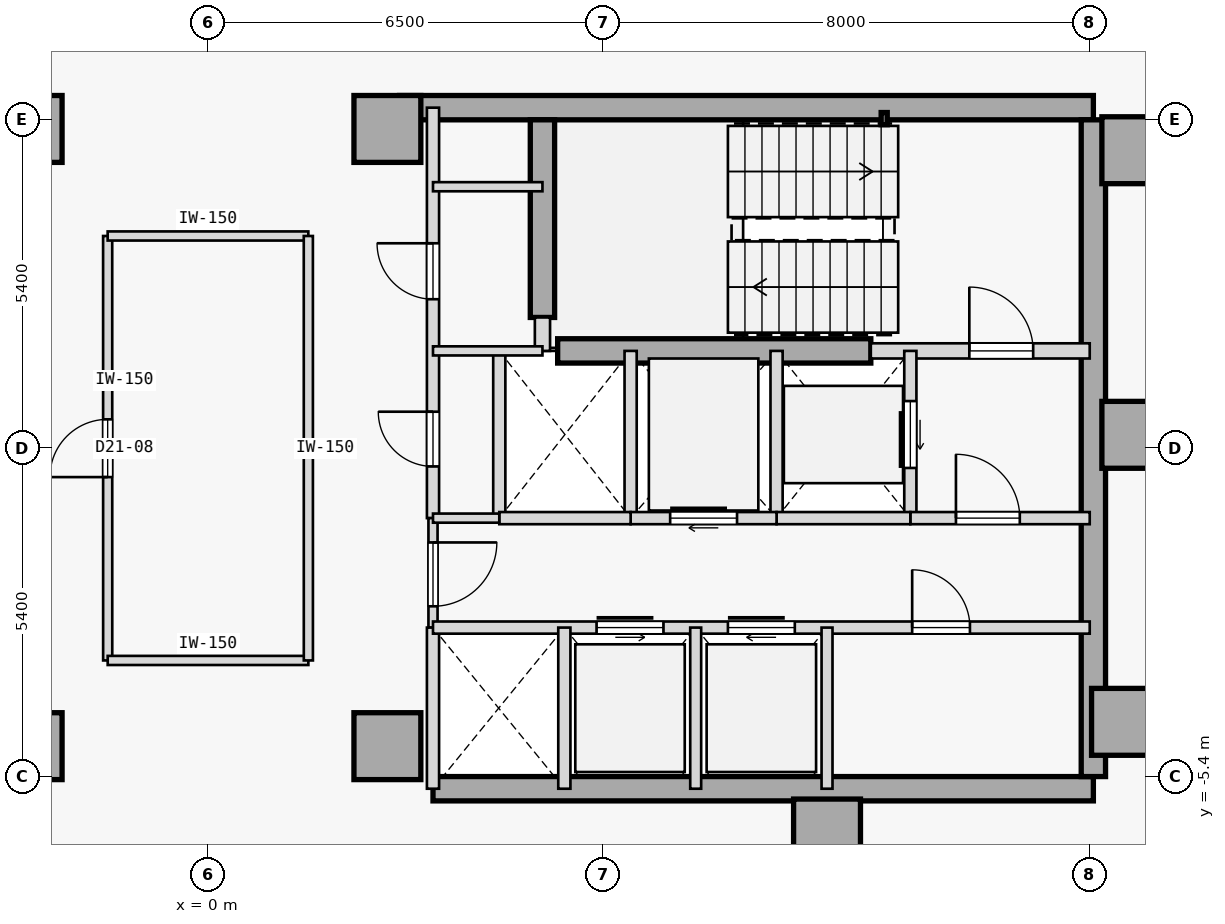
"""IFC4 building model, lengths in metres.
Left out: names, types, materials, properties, quantities, classifications, styles, units other than length and angle.
Written with IfcOpenShell. Run it as: python <this file> out.ifc"""

import sys

from ifc_helpers import new_model, si_unit, direction, frame, frame_2d, origin, origin_2d, place, context, subcontext, project, spatial, rectangle, hollow_rectangle, extrude, element, fill, save


model = new_model("IFC4")
c1 = context("Model", 3, precision=1e-05, world=origin(), true_north=direction((0.0, 1.0)))
c2 = subcontext(c1, "Body", "Model", "MODEL_VIEW")
j1 = project(units=[si_unit("LENGTHUNIT", "METRE"), si_unit("PLANEANGLEUNIT", "RADIAN")], contexts=[c1])
p1 = place(None, origin())
s1 = spatial("IfcSite", under=j1, at=p1, CompositionType="ELEMENT")
p2 = place(p1, origin())
s2 = spatial("IfcBuilding", under=s1, at=p2, CompositionType="ELEMENT")
p3 = place(p2, frame((0.0, 0.0, 87.4)))
s3 = spatial("IfcBuildingStorey", under=s2, at=p3, CompositionType="ELEMENT", Elevation=87.4)
for number, where, z_axis, x_axis in (
    (1, (-2.95, -4.9, 0.0), (0.0, 0.0, 1.0), (1.0, 0.0, 0.0)),
    (2, (-2.95, 5.25, 0.0), (0.0, 0.0, 1.0), (1.0, 0.0, 0.0)),
    (3, (15.25, 4.9, 0.0), (0.0, 0.0, 1.0), (1.0, 0.0, 0.0)),
    (4, (15.25, 0.22, 0.0), (0.0, 0.0, 1.0), (1.0, 0.0, 0.0)),
    (5, (15.08, -4.5, 0.0), (0.0, 0.0, 1.0), (1.0, 0.0, 0.0)),
    (6, (10.18, -6.32, 0.0), (0.0, 0.0, 1.0), (1.0, 0.0, 0.0)),
    (7, (2.95, -4.9, 0.0), (0.0, 0.0, 1.0), (1.0, 0.0, 0.0)),
    (8, (2.95, 5.25, 0.0), (0.0, 0.0, 1.0), (1.0, 0.0, 0.0)),
):
    element("IfcColumn", number, at=place(p3, frame(where, z_axis=z_axis, x_axis=x_axis)), inside=s3, PredefinedType="COLUMN", context=c2, shape_type="SweptSolid", body=[
        extrude(rectangle(XDim=1.1, YDim=1.1, at=origin_2d()), origin(), (0.0, 0.0, 1.0), 3.7),
    ])
p4 = place(p3, frame((3.15, 5.6, 0.0), z_axis=(0.0, 0.0, 1.0), x_axis=(1.0, 0.0, 0.0)))
e9 = element("IfcWall", 9, at=p4, inside=s3, PredefinedType="SHEAR", context=c2, shape_type="SweptSolid", body=[
    extrude(rectangle(XDim=11.41, YDim=0.4, at=frame_2d((5.705, 0.0))), origin(), (0.0, 0.0, 1.0), 3.475),
])
p5 = place(p3, frame((3.7, -5.6, 0.0), z_axis=(0.0, 0.0, 1.0), x_axis=(1.0, 0.0, 0.0)))
e10 = element("IfcWall", 10, at=p5, inside=s3, PredefinedType="SHEAR", context=c2, shape_type="SweptSolid", body=[
    extrude(rectangle(XDim=10.86, YDim=0.4, at=frame_2d((5.43, 0.0))), origin(), (0.0, 0.0, 1.0), 3.475),
])
p6 = place(p3, frame((14.56, -5.4, 0.0), z_axis=(0.0, 0.0, 1.0), x_axis=(0.0, 1.0, 0.0)))
e11 = element("IfcWall", 11, at=p6, inside=s3, PredefinedType="SHEAR", context=c2, shape_type="SweptSolid", body=[
    extrude(rectangle(XDim=10.8, YDim=0.4, at=frame_2d((5.4, 0.0))), origin(), (0.0, 0.0, 1.0), 3.475),
])
p7 = place(p3, frame((5.5, 2.15, 0.0), z_axis=(0.0, 0.0, 1.0), x_axis=(0.0, 1.0, 0.0)))
e12 = element("IfcWall", 12, at=p7, inside=s3, PredefinedType="SHEAR", context=c2, shape_type="SweptSolid", body=[
    extrude(rectangle(XDim=3.25, YDim=0.4, at=frame_2d((1.625, 0.0))), origin(), (0.0, 0.0, 1.0), 3.475),
])
p8 = place(p3, frame((5.75, 1.6, 0.0), z_axis=(0.0, 0.0, 1.0), x_axis=(1.0, 0.0, 0.0)))
e13 = element("IfcWall", 13, at=p8, inside=s3, PredefinedType="SHEAR", context=c2, shape_type="SweptSolid", body=[
    extrude(rectangle(XDim=5.15, YDim=0.4, at=frame_2d((2.575, 0.0))), origin(), (0.0, 0.0, 1.0), 3.475),
])
p9 = place(p3, frame((11.12, 5.42, 0.0), z_axis=(0.0, 0.0, 1.0), x_axis=(1.0, 0.0, 0.0)))
e14 = element("IfcColumn", 14, at=p9, inside=s3, PredefinedType="COLUMN", context=c2, shape_type="SweptSolid", body=[
    extrude(hollow_rectangle(XDim=0.1, YDim=0.2, WallThickness=0.008, at=origin_2d()), origin(), (0.0, 0.0, 1.0), 3.7),
])
p10 = place(p3, frame((10.9, 1.6, 0.0), z_axis=(0.0, 0.0, 1.0), x_axis=(1.0, 0.0, 0.0)))
e15 = element("IfcWall", 15, at=p10, inside=s3, PredefinedType="STANDARD", context=c2, shape_type="SweptSolid", body=[
    extrude(rectangle(XDim=3.6, YDim=0.25, at=frame_2d((1.8, 0.0))), origin(), (0.0, 0.0, 1.0), 3.475),
])
p11 = place(p10, frame((1.62, 0.0, 0.0)))
e16 = element("IfcOpeningElement", 16, at=p11, cuts=e15, PredefinedType="OPENING", context=c2, shape_type="SweptSolid", body=[
    extrude(rectangle(XDim=1.05, YDim=2.15, at=frame_2d((0.525, 1.075))), frame((0.0, 0.135, 0.0), z_axis=(0.0, -1.0, 0.0), x_axis=(1.0, 0.0, 0.0)), (0.0, 0.0, 1.0), 0.27),
])
p12 = place(p3, frame((5.5, 1.6, 0.0), z_axis=(0.0, 0.0, 1.0), x_axis=(0.0, 1.0, 0.0)))
e17 = element("IfcWall", 17, at=p12, inside=s3, PredefinedType="STANDARD", context=c2, shape_type="SweptSolid", body=[
    extrude(rectangle(XDim=0.55, YDim=0.25, at=frame_2d((0.275, 0.0))), origin(), (0.0, 0.0, 1.0), 3.475),
])
p13 = place(p3, frame((3.7, -1.15, 0.0), z_axis=(0.0, 0.0, 1.0), x_axis=(0.0, 1.0, 0.0)))
e18 = element("IfcWall", 18, at=p13, inside=s3, PredefinedType="STANDARD", context=c2, shape_type="SweptSolid", body=[
    extrude(rectangle(XDim=6.75, YDim=0.2, at=frame_2d((3.375, 0.0))), origin(), (0.0, 0.0, 1.0), 3.475),
])
p14 = place(p13, frame((3.6, 0.0, 0.0)))
e19 = element("IfcOpeningElement", 19, at=p14, cuts=e18, PredefinedType="OPENING", context=c2, shape_type="SweptSolid", body=[
    extrude(rectangle(XDim=0.92, YDim=2.15, at=frame_2d((0.46, 1.075))), frame((0.0, 0.11, 0.0), z_axis=(0.0, -1.0, 0.0), x_axis=(1.0, 0.0, 0.0)), (0.0, 0.0, 1.0), 0.22),
])
p15 = place(p13, frame((0.85, 0.0, 0.0)))
e20 = element("IfcOpeningElement", 20, at=p15, cuts=e18, PredefinedType="OPENING", context=c2, shape_type="SweptSolid", body=[
    extrude(rectangle(XDim=0.9, YDim=2.15, at=frame_2d((0.45, 1.075))), frame((0.0, 0.11, 0.0), z_axis=(0.0, -1.0, 0.0), x_axis=(1.0, 0.0, 0.0)), (0.0, 0.0, 1.0), 0.22),
])
p16 = place(p3, frame((3.7, -2.95, 0.0), z_axis=(0.0, 0.0, 1.0), x_axis=(0.0, 1.0, 0.0)))
e21 = element("IfcWall", 21, at=p16, inside=s3, PredefinedType="PARTITIONING", context=c2, shape_type="SweptSolid", body=[
    extrude(rectangle(XDim=1.8, YDim=0.15, at=frame_2d((0.9, 0.0))), origin(), (0.0, 0.0, 1.0), 3.475),
])
p17 = place(p16, frame((0.35, 0.0, 0.0)))
e22 = element("IfcOpeningElement", 22, at=p17, cuts=e21, PredefinedType="OPENING", context=c2, shape_type="SweptSolid", body=[
    extrude(rectangle(XDim=1.05, YDim=2.18, at=frame_2d((0.525, 1.09))), frame((0.0, 0.085, 0.0), z_axis=(0.0, -1.0, 0.0), x_axis=(1.0, 0.0, 0.0)), (0.0, 0.0, 1.0), 0.17),
])
p18 = place(p3, frame((3.7, -5.6, 0.0), z_axis=(0.0, 0.0, 1.0), x_axis=(0.0, 1.0, 0.0)))
e23 = element("IfcWall", 23, at=p18, inside=s3, PredefinedType="STANDARD", context=c2, shape_type="SweptSolid", body=[
    extrude(rectangle(XDim=2.65, YDim=0.2, at=frame_2d((1.325, 0.0))), origin(), (0.0, 0.0, 1.0), 3.475),
])
p19 = place(p3, frame((11.55, -1.15, 0.0), z_axis=(0.0, 0.0, 1.0), x_axis=(0.0, 1.0, 0.0)))
e24 = element("IfcWall", 24, at=p19, inside=s3, PredefinedType="STANDARD", context=c2, shape_type="SweptSolid", body=[
    extrude(rectangle(XDim=2.75, YDim=0.2, at=frame_2d((1.375, 0.0))), origin(), (0.0, 0.0, 1.0), 3.475),
])
p20 = place(p19, frame((0.825, 0.0, 0.0)))
e25 = element("IfcOpeningElement", 25, at=p20, cuts=e24, PredefinedType="OPENING", context=c2, shape_type="SweptSolid", body=[
    extrude(rectangle(XDim=1.1, YDim=2.15, at=frame_2d((0.55, 1.075))), frame((0.0, 0.11, 0.0), z_axis=(0.0, -1.0, 0.0), x_axis=(1.0, 0.0, 0.0)), (0.0, 0.0, 1.0), 0.22),
])
p21 = place(p3, frame((9.35, -1.15, 0.0), z_axis=(0.0, 0.0, 1.0), x_axis=(0.0, 1.0, 0.0)))
e26 = element("IfcWall", 26, at=p21, inside=s3, PredefinedType="STANDARD", context=c2, shape_type="SweptSolid", body=[
    extrude(rectangle(XDim=2.75, YDim=0.2, at=frame_2d((1.375, 0.0))), origin(), (0.0, 0.0, 1.0), 3.475),
])
p22 = place(p3, frame((11.55, -1.15, 0.0), z_axis=(0.0, 0.0, 1.0), x_axis=(1.0, 0.0, 0.0)))
e27 = element("IfcWall", 27, at=p22, inside=s3, PredefinedType="STANDARD", context=c2, shape_type="SweptSolid", body=[
    extrude(rectangle(XDim=2.95, YDim=0.2, at=frame_2d((1.475, 0.0))), origin(), (0.0, 0.0, 1.0), 3.475),
])
p23 = place(p22, frame((0.75, 0.0, 0.0)))
e28 = element("IfcOpeningElement", 28, at=p23, cuts=e27, PredefinedType="OPENING", context=c2, shape_type="SweptSolid", body=[
    extrude(rectangle(XDim=1.05, YDim=2.18, at=frame_2d((0.525, 1.09))), frame((0.0, 0.11, 0.0), z_axis=(0.0, -1.0, 0.0), x_axis=(1.0, 0.0, 0.0)), (0.0, 0.0, 1.0), 0.22),
])
p24 = place(p3, frame((9.35, -1.15, 0.0), z_axis=(0.0, 0.0, 1.0), x_axis=(1.0, 0.0, 0.0)))
e29 = element("IfcWall", 29, at=p24, inside=s3, PredefinedType="STANDARD", context=c2, shape_type="SweptSolid", body=[
    extrude(rectangle(XDim=2.2, YDim=0.2, at=frame_2d((1.1, 0.0))), origin(), (0.0, 0.0, 1.0), 3.475),
])
p25 = place(p3, frame((6.95, -1.15, 0.0), z_axis=(0.0, 0.0, 1.0), x_axis=(0.0, 1.0, 0.0)))
e30 = element("IfcWall", 30, at=p25, inside=s3, PredefinedType="STANDARD", context=c2, shape_type="SweptSolid", body=[
    extrude(rectangle(XDim=2.75, YDim=0.2, at=frame_2d((1.375, 0.0))), origin(), (0.0, 0.0, 1.0), 3.475),
])
p26 = place(p3, frame((6.95, -1.15, 0.0), z_axis=(0.0, 0.0, 1.0), x_axis=(1.0, 0.0, 0.0)))
e31 = element("IfcWall", 31, at=p26, inside=s3, PredefinedType="STANDARD", context=c2, shape_type="SweptSolid", body=[
    extrude(rectangle(XDim=2.4, YDim=0.2, at=frame_2d((1.2, 0.0))), origin(), (0.0, 0.0, 1.0), 3.475),
])
p27 = place(p26, frame((0.65, 0.0, 0.0)))
e32 = element("IfcOpeningElement", 32, at=p27, cuts=e31, PredefinedType="OPENING", context=c2, shape_type="SweptSolid", body=[
    extrude(rectangle(XDim=1.1, YDim=2.15, at=frame_2d((0.55, 1.075))), frame((0.0, 0.11, 0.0), z_axis=(0.0, -1.0, 0.0), x_axis=(1.0, 0.0, 0.0)), (0.0, 0.0, 1.0), 0.22),
])
p28 = place(p3, frame((4.79, -1.15, 0.0), z_axis=(0.0, 0.0, 1.0), x_axis=(0.0, 1.0, 0.0)))
e33 = element("IfcWall", 33, at=p28, inside=s3, PredefinedType="STANDARD", context=c2, shape_type="SweptSolid", body=[
    extrude(rectangle(XDim=2.75, YDim=0.2, at=frame_2d((1.375, 0.0))), origin(), (0.0, 0.0, 1.0), 3.475),
])
p29 = place(p3, frame((4.79, -1.15, 0.0), z_axis=(0.0, 0.0, 1.0), x_axis=(1.0, 0.0, 0.0)))
e34 = element("IfcWall", 34, at=p29, inside=s3, PredefinedType="STANDARD", context=c2, shape_type="SweptSolid", body=[
    extrude(rectangle(XDim=2.16, YDim=0.2, at=frame_2d((1.08, 0.0))), origin(), (0.0, 0.0, 1.0), 3.475),
])
p30 = place(p3, frame((3.7, -1.15, 0.0), z_axis=(0.0, 0.0, 1.0), x_axis=(1.0, 0.0, 0.0)))
e35 = element("IfcWall", 35, at=p30, inside=s3, PredefinedType="PARTITIONING", context=c2, shape_type="SweptSolid", body=[
    extrude(rectangle(XDim=1.09, YDim=0.15, at=frame_2d((0.545, 0.0))), origin(), (0.0, 0.0, 1.0), 3.475),
])
p31 = place(p3, frame((3.7, -2.95, 0.0), z_axis=(0.0, 0.0, 1.0), x_axis=(1.0, 0.0, 0.0)))
e36 = element("IfcWall", 36, at=p31, inside=s3, PredefinedType="STANDARD", context=c2, shape_type="SweptSolid", body=[
    extrude(rectangle(XDim=10.8, YDim=0.2, at=frame_2d((5.4, 0.0))), origin(), (0.0, 0.0, 1.0), 3.475),
])
p32 = place(p31, frame((2.69, 0.0, 0.0)))
e37 = element("IfcOpeningElement", 37, at=p32, cuts=e36, PredefinedType="OPENING", context=c2, shape_type="SweptSolid", body=[
    extrude(rectangle(XDim=1.1, YDim=2.15, at=frame_2d((0.55, 1.075))), frame((0.0, 0.11, 0.0), z_axis=(0.0, -1.0, 0.0), x_axis=(1.0, 0.0, 0.0)), (0.0, 0.0, 1.0), 0.22),
])
p33 = place(p31, frame((4.85, 0.0, 0.0)))
e38 = element("IfcOpeningElement", 38, at=p33, cuts=e36, PredefinedType="OPENING", context=c2, shape_type="SweptSolid", body=[
    extrude(rectangle(XDim=1.1, YDim=2.15, at=frame_2d((0.55, 1.075))), frame((0.0, 0.11, 0.0), z_axis=(0.0, -1.0, 0.0), x_axis=(1.0, 0.0, 0.0)), (0.0, 0.0, 1.0), 0.22),
])
p34 = place(p31, frame((7.88, 0.0, 0.0)))
e39 = element("IfcOpeningElement", 39, at=p34, cuts=e36, PredefinedType="OPENING", context=c2, shape_type="SweptSolid", body=[
    extrude(rectangle(XDim=0.95, YDim=2.15, at=frame_2d((0.475, 1.075))), frame((0.0, 0.11, 0.0), z_axis=(0.0, -1.0, 0.0), x_axis=(1.0, 0.0, 0.0)), (0.0, 0.0, 1.0), 0.22),
])
p35 = place(p3, frame((5.86, -5.6, 0.0), z_axis=(0.0, 0.0, 1.0), x_axis=(0.0, 1.0, 0.0)))
e40 = element("IfcWall", 40, at=p35, inside=s3, PredefinedType="STANDARD", context=c2, shape_type="SweptSolid", body=[
    extrude(rectangle(XDim=2.65, YDim=0.2, at=frame_2d((1.325, 0.0))), origin(), (0.0, 0.0, 1.0), 3.475),
])
for number, where, z_axis, x_axis in (
    (41, (10.18, -5.6, 0.0), (0.0, 0.0, 1.0), (0.0, 1.0, 0.0)),
    (42, (8.02, -5.6, 0.0), (0.0, 0.0, 1.0), (0.0, 1.0, 0.0)),
):
    element("IfcWall", number, at=place(p3, frame(where, z_axis=z_axis, x_axis=x_axis)), inside=s3, PredefinedType="STANDARD", context=c2, shape_type="SweptSolid", body=[
        extrude(rectangle(XDim=2.65, YDim=0.18, at=frame_2d((1.325, 0.0))), origin(), (0.0, 0.0, 1.0), 3.475),
    ])
for number, where, z_axis, x_axis in (
    (43, (3.7, 4.3, 0.0), (0.0, 0.0, 1.0), (1.0, 0.0, 0.0)),
    (44, (3.7, 1.6, 0.0), (0.0, 0.0, 1.0), (1.0, 0.0, 0.0)),
):
    element("IfcWall", number, at=place(p3, frame(where, z_axis=z_axis, x_axis=x_axis)), inside=s3, PredefinedType="PARTITIONING", context=c2, shape_type="SweptSolid", body=[
        extrude(rectangle(XDim=1.8, YDim=0.15, at=frame_2d((0.9, 0.0))), origin(), (0.0, 0.0, 1.0), 3.475),
    ])
p36 = place(p3, frame((-1.65, -3.49, 0.0), z_axis=(0.0, 0.0, 1.0), x_axis=(-0.000104928124, 0.999999994495, 0.0)))
e45 = element("IfcWall", 45, at=p36, inside=s3, PredefinedType="PARTITIONING", context=c2, shape_type="SweptSolid", body=[
    extrude(rectangle(XDim=6.98, YDim=0.15, at=frame_2d((3.49, 0.0))), origin(), (0.0, 0.0, 1.0), 3.475),
])
p37 = place(p36, frame((3.015, 0.0, 0.0)))
e46 = element("IfcOpeningElement", 46, at=p37, cuts=e45, PredefinedType="OPENING", context=c2, shape_type="SweptSolid", body=[
    extrude(rectangle(XDim=0.95, YDim=2.15, at=frame_2d((0.475, 1.075))), frame((0.0, 0.085, 0.0), z_axis=(0.0, -1.0, 0.0), x_axis=(1.0, 0.0, 0.0)), (0.0, 0.0, 1.0), 0.17),
])
p38 = place(p3, frame((-1.65, -3.49, 0.0), z_axis=(0.0, 0.0, 1.0), x_axis=(1.0, 0.0, 0.0)))
e47 = element("IfcWall", 47, at=p38, inside=s3, PredefinedType="PARTITIONING", context=c2, shape_type="SweptSolid", body=[
    extrude(rectangle(XDim=3.3, YDim=0.15, at=frame_2d((1.65, 0.0))), origin(), (0.0, 0.0, 1.0), 3.475),
])
p39 = place(p3, frame((-1.65, 3.49, 0.0), z_axis=(0.0, 0.0, 1.0), x_axis=(1.0, 0.0, 0.0)))
e48 = element("IfcWall", 48, at=p39, inside=s3, PredefinedType="PARTITIONING", context=c2, shape_type="SweptSolid", body=[
    extrude(rectangle(XDim=3.3, YDim=0.15, at=frame_2d((1.65, 0.0))), origin(), (0.0, 0.0, 1.0), 3.475),
])
p40 = place(p3, frame((1.65, -3.49, 0.0), z_axis=(0.0, 0.0, 1.0), x_axis=(-6.9952083e-05, 0.999999997553, 0.0)))
e49 = element("IfcWall", 49, at=p40, inside=s3, PredefinedType="PARTITIONING", context=c2, shape_type="SweptSolid", body=[
    extrude(rectangle(XDim=6.98, YDim=0.15, at=frame_2d((3.49, 0.0))), origin(), (0.0, 0.0, 1.0), 3.475),
])
p41 = place(p11, origin())
e50 = element("IfcDoor", 50, at=p41, inside=s3, OperationType="SINGLE_SWING_LEFT", PredefinedType="DOOR", context=c2, shape_type="SweptSolid", body=[
    extrude(rectangle(XDim=1.05, YDim=2.15, at=frame_2d((0.525, 1.075))), frame((0.0, 0.025, 0.0), z_axis=(0.0, -1.0, 0.0), x_axis=(1.0, 0.0, 0.0)), (0.0, 0.0, 1.0), 0.05),
])
fill(e16, e50)
p42 = place(p23, origin())
e51 = element("IfcDoor", 51, at=p42, inside=s3, OperationType="SINGLE_SWING_LEFT", PredefinedType="DOOR", context=c2, shape_type="SweptSolid", body=[
    extrude(rectangle(XDim=1.05, YDim=2.18, at=frame_2d((0.525, 1.09))), frame((0.0, 0.025, 0.0), z_axis=(0.0, -1.0, 0.0), x_axis=(1.0, 0.0, 0.0)), (0.0, 0.0, 1.0), 0.05),
])
fill(e28, e51)
p43 = place(p17, frame((1.05, 0.0, 0.0), z_axis=(0.0, 0.0, 1.0), x_axis=(-1.0, 0.0, 0.0)))
e52 = element("IfcDoor", 52, at=p43, inside=s3, OperationType="SINGLE_SWING_RIGHT", PredefinedType="DOOR", context=c2, shape_type="SweptSolid", body=[
    extrude(rectangle(XDim=1.05, YDim=2.18, at=frame_2d((0.525, 1.09))), frame((0.0, 0.025, 0.0), z_axis=(0.0, -1.0, 0.0), x_axis=(1.0, 0.0, 0.0)), (0.0, 0.0, 1.0), 0.05),
])
fill(e22, e52)
p44 = place(p20, origin())
e53 = element("IfcDoor", 53, at=p44, inside=s3, OperationType="SLIDING_TO_RIGHT", PredefinedType="DOOR", context=c2, shape_type="SweptSolid", body=[
    extrude(rectangle(XDim=1.1, YDim=2.15, at=frame_2d((0.55, 1.075))), frame((0.0, 0.025, 0.0), z_axis=(0.0, -1.0, 0.0), x_axis=(1.0, 0.0, 0.0)), (0.0, 0.0, 1.0), 0.05),
])
fill(e25, e53)
p45 = place(p27, origin())
e54 = element("IfcDoor", 54, at=p45, inside=s3, OperationType="SLIDING_TO_RIGHT", PredefinedType="DOOR", context=c2, shape_type="SweptSolid", body=[
    extrude(rectangle(XDim=1.1, YDim=2.15, at=frame_2d((0.55, 1.075))), frame((0.0, 0.025, 0.0), z_axis=(0.0, -1.0, 0.0), x_axis=(1.0, 0.0, 0.0)), (0.0, 0.0, 1.0), 0.05),
])
fill(e32, e54)
p46 = place(p32, origin())
e55 = element("IfcDoor", 55, at=p46, inside=s3, OperationType="SLIDING_TO_LEFT", PredefinedType="DOOR", context=c2, shape_type="SweptSolid", body=[
    extrude(rectangle(XDim=1.1, YDim=2.15, at=frame_2d((0.55, 1.075))), frame((0.0, 0.025, 0.0), z_axis=(0.0, -1.0, 0.0), x_axis=(1.0, 0.0, 0.0)), (0.0, 0.0, 1.0), 0.05),
])
fill(e37, e55)
p47 = place(p33, origin())
e56 = element("IfcDoor", 56, at=p47, inside=s3, OperationType="SLIDING_TO_RIGHT", PredefinedType="DOOR", context=c2, shape_type="SweptSolid", body=[
    extrude(rectangle(XDim=1.1, YDim=2.15, at=frame_2d((0.55, 1.075))), frame((0.0, 0.025, 0.0), z_axis=(0.0, -1.0, 0.0), x_axis=(1.0, 0.0, 0.0)), (0.0, 0.0, 1.0), 0.05),
])
fill(e38, e56)
p48 = place(p34, origin())
e57 = element("IfcDoor", 57, at=p48, inside=s3, OperationType="SINGLE_SWING_LEFT", PredefinedType="DOOR", context=c2, shape_type="SweptSolid", body=[
    extrude(rectangle(XDim=0.95, YDim=2.15, at=frame_2d((0.475, 1.075))), frame((0.0, 0.025, 0.0), z_axis=(0.0, -1.0, 0.0), x_axis=(1.0, 0.0, 0.0)), (0.0, 0.0, 1.0), 0.05),
])
fill(e39, e57)
p49 = place(p14, origin())
e58 = element("IfcDoor", 58, at=p49, inside=s3, OperationType="SINGLE_SWING_RIGHT", PredefinedType="DOOR", context=c2, shape_type="SweptSolid", body=[
    extrude(rectangle(XDim=0.92, YDim=2.15, at=frame_2d((0.46, 1.075))), frame((0.0, 0.025, 0.0), z_axis=(0.0, -1.0, 0.0), x_axis=(1.0, 0.0, 0.0)), (0.0, 0.0, 1.0), 0.05),
])
fill(e19, e58)
p50 = place(p15, origin())
e59 = element("IfcDoor", 59, at=p50, inside=s3, OperationType="SINGLE_SWING_RIGHT", PredefinedType="DOOR", context=c2, shape_type="SweptSolid", body=[
    extrude(rectangle(XDim=0.9, YDim=2.15, at=frame_2d((0.45, 1.075))), frame((0.0, 0.025, 0.0), z_axis=(0.0, -1.0, 0.0), x_axis=(1.0, 0.0, 0.0)), (0.0, 0.0, 1.0), 0.05),
])
fill(e20, e59)
p51 = place(p37, origin())
e60 = element("IfcDoor", 60, at=p51, inside=s3, OperationType="SINGLE_SWING_LEFT", PredefinedType="DOOR", context=c2, shape_type="SweptSolid", body=[
    extrude(rectangle(XDim=0.95, YDim=2.15, at=frame_2d((0.475, 1.075))), frame((0.0, 0.025, 0.0), z_axis=(0.0, -1.0, 0.0), x_axis=(1.0, 0.0, 0.0)), (0.0, 0.0, 1.0), 0.05),
])
fill(e46, e60)
save(model, sys.argv[1])
